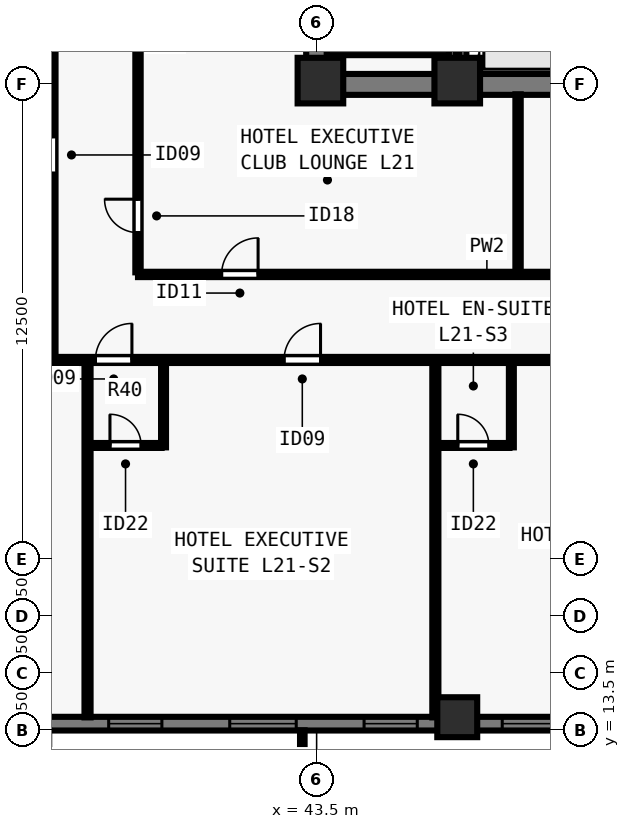
"""IFC4 building model, lengths in metres.
Left out: names, types, materials, properties, quantities, classifications, styles, units other than length and angle.
Written with IfcOpenShell. Run it as: python <this file> out.ifc"""

import sys

from ifc_helpers import new_model, si_unit, direction, frame, frame_2d, origin, origin_2d, place, context, subcontext, project, spatial, rectangle, extrude, element, fill, save


model = new_model("IFC4")
c1 = context("Model", 3, precision=1e-05, world=origin(), true_north=direction((0.0, 1.0)))
c2 = subcontext(c1, "Body", "Model", "MODEL_VIEW")
j1 = project(units=[si_unit("LENGTHUNIT", "METRE"), si_unit("PLANEANGLEUNIT", "RADIAN")], contexts=[c1])
p1 = place(None, origin())
s1 = spatial("IfcSite", under=j1, at=p1, CompositionType="ELEMENT")
p2 = place(p1, origin())
s2 = spatial("IfcBuilding", under=s1, at=p2, CompositionType="ELEMENT")
p3 = place(p2, frame((0.0, 0.0, 79.5)))
s3 = spatial("IfcBuildingStorey", under=s2, at=p3, CompositionType="ELEMENT", Elevation=79.5)
for number, where, z_axis, x_axis in (
    (1, (43.6, 30.6, 0.0), (0.0, 0.0, 1.0), (1.0, 0.0, 0.0)),
    (2, (47.2, 30.6, 0.0), (0.0, 0.0, 1.0), (1.0, 0.0, 0.0)),
):
    element("IfcColumn", number, at=place(p3, frame(where, z_axis=z_axis, x_axis=x_axis)), inside=s3, PredefinedType="COLUMN", context=c2, shape_type="SweptSolid", body=[
        extrude(rectangle(XDim=1.2, YDim=1.2, at=origin_2d()), origin(), (0.0, 0.0, 1.0), 3.5),
    ])
p4 = place(p3, frame((47.2, 13.85, 0.0), z_axis=(0.0, 0.0, 1.0), x_axis=(1.0, 0.0, 0.0)))
e3 = element("IfcColumn", 3, at=p4, inside=s3, PredefinedType="COLUMN", context=c2, shape_type="SweptSolid", body=[
    extrude(rectangle(XDim=1.05, YDim=1.05, at=origin_2d()), origin(), (0.0, 0.0, 1.0), 3.5),
])
p5 = place(p3, frame((74.5, 13.68, 0.0), z_axis=(0.0, 0.0, 1.0), x_axis=(-1.0, 0.0, 0.0)))
e4 = element("IfcWall", 4, at=p5, inside=s3, PredefinedType="SOLIDWALL", context=c2, shape_type="SweptSolid", body=[
    extrude(rectangle(XDim=44.662, YDim=0.36, at=frame_2d((22.331, 0.0))), origin(), (0.0, 0.0, 1.0), 3.28),
])
p6 = place(p5, frame((4.655, 0.0, 0.8)))
e5 = element("IfcOpeningElement", 5, at=p6, cuts=e4, PredefinedType="OPENING", context=c2, shape_type="SweptSolid", body=[
    extrude(rectangle(XDim=1.75, YDim=1.544, at=frame_2d((0.875, 0.772))), frame((0.0, 0.19, 0.0), z_axis=(0.0, -1.0, 0.0), x_axis=(1.0, 0.0, 0.0)), (0.0, 0.0, 1.0), 0.38),
])
p7 = place(p5, frame((8.19, 0.0, 0.8)))
e6 = element("IfcOpeningElement", 6, at=p7, cuts=e4, PredefinedType="OPENING", context=c2, shape_type="SweptSolid", body=[
    extrude(rectangle(XDim=1.4, YDim=1.544, at=frame_2d((0.7, 0.772))), frame((0.0, 0.19, 0.0), z_axis=(0.0, -1.0, 0.0), x_axis=(1.0, 0.0, 0.0)), (0.0, 0.0, 1.0), 0.38),
])
p8 = place(p5, frame((11.375, 0.0, 0.8)))
e7 = element("IfcOpeningElement", 7, at=p8, cuts=e4, PredefinedType="OPENING", context=c2, shape_type="SweptSolid", body=[
    extrude(rectangle(XDim=1.75, YDim=1.544, at=frame_2d((0.875, 0.772))), frame((0.0, 0.19, 0.0), z_axis=(0.0, -1.0, 0.0), x_axis=(1.0, 0.0, 0.0)), (0.0, 0.0, 1.0), 0.38),
])
p9 = place(p5, frame((14.911, 0.0, 0.8)))
e8 = element("IfcOpeningElement", 8, at=p9, cuts=e4, PredefinedType="OPENING", context=c2, shape_type="SweptSolid", body=[
    extrude(rectangle(XDim=1.4, YDim=1.544, at=frame_2d((0.7, 0.772))), frame((0.0, 0.19, 0.0), z_axis=(0.0, -1.0, 0.0), x_axis=(1.0, 0.0, 0.0)), (0.0, 0.0, 1.0), 0.38),
])
p10 = place(p5, frame((18.546, 0.0, 0.8)))
e9 = element("IfcOpeningElement", 9, at=p10, cuts=e4, PredefinedType="OPENING", context=c2, shape_type="SweptSolid", body=[
    extrude(rectangle(XDim=1.75, YDim=1.544, at=frame_2d((0.875, 0.772))), frame((0.0, 0.19, 0.0), z_axis=(0.0, -1.0, 0.0), x_axis=(1.0, 0.0, 0.0)), (0.0, 0.0, 1.0), 0.38),
])
p11 = place(p5, frame((21.631, 0.0, 0.8)))
e10 = element("IfcOpeningElement", 10, at=p11, cuts=e4, PredefinedType="OPENING", context=c2, shape_type="SweptSolid", body=[
    extrude(rectangle(XDim=1.4, YDim=1.544, at=frame_2d((0.7, 0.772))), frame((0.0, 0.19, 0.0), z_axis=(0.0, -1.0, 0.0), x_axis=(1.0, 0.0, 0.0)), (0.0, 0.0, 1.0), 0.38),
])
p12 = place(p5, frame((24.366, 0.0, 0.8)))
e11 = element("IfcOpeningElement", 11, at=p12, cuts=e4, PredefinedType="OPENING", context=c2, shape_type="SweptSolid", body=[
    extrude(rectangle(XDim=1.75, YDim=1.544, at=frame_2d((0.875, 0.772))), frame((0.0, 0.19, 0.0), z_axis=(0.0, -1.0, 0.0), x_axis=(1.0, 0.0, 0.0)), (0.0, 0.0, 1.0), 0.38),
])
p13 = place(p5, frame((28.351, 0.0, 0.8)))
e12 = element("IfcOpeningElement", 12, at=p13, cuts=e4, PredefinedType="OPENING", context=c2, shape_type="SweptSolid", body=[
    extrude(rectangle(XDim=1.4, YDim=1.544, at=frame_2d((0.7, 0.772))), frame((0.0, 0.19, 0.0), z_axis=(0.0, -1.0, 0.0), x_axis=(1.0, 0.0, 0.0)), (0.0, 0.0, 1.0), 0.38),
])
p14 = place(p5, frame((31.537, 0.0, 0.8)))
e13 = element("IfcOpeningElement", 13, at=p14, cuts=e4, PredefinedType="OPENING", context=c2, shape_type="SweptSolid", body=[
    extrude(rectangle(XDim=1.75, YDim=1.544, at=frame_2d((0.875, 0.772))), frame((0.0, 0.19, 0.0), z_axis=(0.0, -1.0, 0.0), x_axis=(1.0, 0.0, 0.0)), (0.0, 0.0, 1.0), 0.38),
])
p15 = place(p5, frame((35.072, 0.0, 0.8)))
e14 = element("IfcOpeningElement", 14, at=p15, cuts=e4, PredefinedType="OPENING", context=c2, shape_type="SweptSolid", body=[
    extrude(rectangle(XDim=1.4, YDim=1.544, at=frame_2d((0.7, 0.772))), frame((0.0, 0.19, 0.0), z_axis=(0.0, -1.0, 0.0), x_axis=(1.0, 0.0, 0.0)), (0.0, 0.0, 1.0), 0.38),
])
p16 = place(p5, frame((38.257, 0.0, 0.8)))
e15 = element("IfcOpeningElement", 15, at=p16, cuts=e4, PredefinedType="OPENING", context=c2, shape_type="SweptSolid", body=[
    extrude(rectangle(XDim=1.75, YDim=1.544, at=frame_2d((0.875, 0.772))), frame((0.0, 0.19, 0.0), z_axis=(0.0, -1.0, 0.0), x_axis=(1.0, 0.0, 0.0)), (0.0, 0.0, 1.0), 0.38),
])
p17 = place(p3, frame((43.225, 30.5, 0.0), z_axis=(0.0, 0.0, 1.0), x_axis=(1.0, 0.0, 0.0)))
e16 = element("IfcWall", 16, at=p17, inside=s3, PredefinedType="SHEAR", context=c2, shape_type="SweptSolid", body=[
    extrude(rectangle(XDim=17.55, YDim=0.55, at=frame_2d((8.775, 0.0))), origin(), (0.0, 0.0, 1.0), 3.28),
])
p18 = place(p3, frame((43.5, 30.765, 0.0), z_axis=(0.0, 0.0, 1.0), x_axis=(0.0, 1.0, 0.0)))
e17 = element("IfcWall", 17, at=p18, inside=s3, PredefinedType="SHEAR", context=c2, shape_type="SweptSolid", body=[
    extrude(rectangle(XDim=7.985, YDim=0.55, at=frame_2d((3.993, 0.0))), origin(), (0.0, 0.0, 1.0), 3.28),
])
p19 = place(p3, frame((47.35, 30.76, 0.0), z_axis=(0.0, 0.0, 1.0), x_axis=(0.0, 1.0, 0.0)))
e18 = element("IfcWall", 18, at=p19, inside=s3, PredefinedType="SOLIDWALL", context=c2, shape_type="SweptSolid", body=[
    extrude(rectangle(XDim=7.855, YDim=0.18, at=frame_2d((3.927, 0.0))), origin(), (0.0, 0.0, 1.0), 3.28),
])
p20 = place(p3, frame((36.55, 23.25, 0.0), z_axis=(0.0, 0.0, 1.0), x_axis=(1.0, 0.0, 0.0)))
e19 = element("IfcWall", 19, at=p20, inside=s3, PredefinedType="PARTITIONING", context=c2, shape_type="SweptSolid", body=[
    extrude(rectangle(XDim=30.9, YDim=0.16, at=frame_2d((15.45, 0.0))), origin(), (0.0, 0.0, 1.0), 3.28),
])
p21 = place(p20, frame((1.13, 0.0, 0.0)))
e20 = element("IfcOpeningElement", 20, at=p21, cuts=e19, PredefinedType="OPENING", context=c2, shape_type="SweptSolid", body=[
    extrude(rectangle(XDim=0.96, YDim=2.15, at=frame_2d((0.48, 1.075))), frame((0.0, 0.09, 0.0), z_axis=(0.0, -1.0, 0.0), x_axis=(1.0, 0.0, 0.0)), (0.0, 0.0, 1.0), 0.18),
])
p22 = place(p20, frame((6.093, 0.0, 0.0)))
e21 = element("IfcOpeningElement", 21, at=p22, cuts=e19, PredefinedType="OPENING", context=c2, shape_type="SweptSolid", body=[
    extrude(rectangle(XDim=0.96, YDim=2.15, at=frame_2d((0.48, 1.075))), frame((0.0, 0.09, 0.0), z_axis=(0.0, -1.0, 0.0), x_axis=(1.0, 0.0, 0.0)), (0.0, 0.0, 1.0), 0.18),
])
p23 = place(p20, frame((16.125, 0.0, 0.0)))
e22 = element("IfcOpeningElement", 22, at=p23, cuts=e19, PredefinedType="OPENING", context=c2, shape_type="SweptSolid", body=[
    extrude(rectangle(XDim=0.96, YDim=2.15, at=frame_2d((0.48, 1.075))), frame((0.0, 0.09, 0.0), z_axis=(0.0, -1.0, 0.0), x_axis=(1.0, 0.0, 0.0)), (0.0, 0.0, 1.0), 0.18),
])
p24 = place(p20, frame((26.157, 0.0, 0.0)))
e23 = element("IfcOpeningElement", 23, at=p24, cuts=e19, PredefinedType="OPENING", context=c2, shape_type="SweptSolid", body=[
    extrude(rectangle(XDim=0.96, YDim=2.15, at=frame_2d((0.48, 1.075))), frame((0.0, 0.09, 0.0), z_axis=(0.0, -1.0, 0.0), x_axis=(1.0, 0.0, 0.0)), (0.0, 0.0, 1.0), 0.18),
])
p25 = place(p20, frame((28.92, 0.0, 0.0)))
e24 = element("IfcOpeningElement", 24, at=p25, cuts=e19, PredefinedType="OPENING", context=c2, shape_type="SweptSolid", body=[
    extrude(rectangle(XDim=0.96, YDim=2.15, at=frame_2d((0.48, 1.075))), frame((0.0, 0.09, 0.0), z_axis=(0.0, -1.0, 0.0), x_axis=(1.0, 0.0, 0.0)), (0.0, 0.0, 1.0), 0.18),
])
p26 = place(p3, frame((36.55, 23.315, 0.0), z_axis=(0.0, 0.0, 1.0), x_axis=(0.0, 1.0, 0.0)))
e25 = element("IfcWall", 25, at=p26, inside=s3, PredefinedType="PARTITIONING", context=c2, shape_type="SweptSolid", body=[
    extrude(rectangle(XDim=31.37, YDim=0.16, at=frame_2d((15.685, 0.0))), origin(), (0.0, 0.0, 1.0), 3.28),
])
p27 = place(p26, frame((4.848, 0.0, 0.0)))
e26 = element("IfcOpeningElement", 26, at=p27, cuts=e25, PredefinedType="OPENING", context=c2, shape_type="SweptSolid", body=[
    extrude(rectangle(XDim=0.96, YDim=2.15, at=frame_2d((0.48, 1.075))), frame((0.0, 0.09, 0.0), z_axis=(0.0, -1.0, 0.0), x_axis=(1.0, 0.0, 0.0)), (0.0, 0.0, 1.0), 0.18),
])
p28 = place(p26, frame((12.39, 0.0, 0.0)))
e27 = element("IfcOpeningElement", 27, at=p28, cuts=e25, PredefinedType="OPENING", context=c2, shape_type="SweptSolid", body=[
    extrude(rectangle(XDim=0.96, YDim=2.15, at=frame_2d((0.48, 1.075))), frame((0.0, 0.09, 0.0), z_axis=(0.0, -1.0, 0.0), x_axis=(1.0, 0.0, 0.0)), (0.0, 0.0, 1.0), 0.18),
])
p29 = place(p26, frame((20.265, 0.0, 0.0)))
e28 = element("IfcOpeningElement", 28, at=p29, cuts=e25, PredefinedType="OPENING", context=c2, shape_type="SweptSolid", body=[
    extrude(rectangle(XDim=0.96, YDim=2.15, at=frame_2d((0.48, 1.075))), frame((0.0, 0.09, 0.0), z_axis=(0.0, -1.0, 0.0), x_axis=(1.0, 0.0, 0.0)), (0.0, 0.0, 1.0), 0.18),
])
p30 = place(p26, frame((28.223, 0.0, 0.0)))
e29 = element("IfcOpeningElement", 29, at=p30, cuts=e25, PredefinedType="OPENING", context=c2, shape_type="SweptSolid", body=[
    extrude(rectangle(XDim=0.96, YDim=2.15, at=frame_2d((0.48, 1.075))), frame((0.0, 0.09, 0.0), z_axis=(0.0, -1.0, 0.0), x_axis=(1.0, 0.0, 0.0)), (0.0, 0.0, 1.0), 0.18),
])
p31 = place(p3, frame((38.8, 25.5, 0.0), z_axis=(0.0, 0.0, 1.0), x_axis=(1.0, 0.0, 0.0)))
e30 = element("IfcWall", 30, at=p31, inside=s3, PredefinedType="PARTITIONING", context=c2, shape_type="SweptSolid", body=[
    extrude(rectangle(XDim=26.4, YDim=0.14, at=frame_2d((13.2, 0.0))), origin(), (0.0, 0.0, 1.0), 3.28),
])
p32 = place(p31, frame((2.2, 0.0, 0.0)))
e31 = element("IfcOpeningElement", 31, at=p32, cuts=e30, PredefinedType="OPENING", context=c2, shape_type="SweptSolid", body=[
    extrude(rectangle(XDim=0.96, YDim=2.12, at=frame_2d((0.48, 1.06))), frame((0.0, 0.08, 0.0), z_axis=(0.0, -1.0, 0.0), x_axis=(1.0, 0.0, 0.0)), (0.0, 0.0, 1.0), 0.16),
])
p33 = place(p31, frame((15.2, 0.0, 0.0)))
e32 = element("IfcOpeningElement", 32, at=p33, cuts=e30, PredefinedType="OPENING", context=c2, shape_type="SweptSolid", body=[
    extrude(rectangle(XDim=0.96, YDim=2.12, at=frame_2d((0.48, 1.06))), frame((0.0, 0.08, 0.0), z_axis=(0.0, -1.0, 0.0), x_axis=(1.0, 0.0, 0.0)), (0.0, 0.0, 1.0), 0.16),
])
p34 = place(p3, frame((38.8, 25.555, 0.0), z_axis=(0.0, 0.0, 1.0), x_axis=(0.0, 1.0, 0.0)))
e33 = element("IfcWall", 33, at=p34, inside=s3, PredefinedType="PARTITIONING", context=c2, shape_type="SweptSolid", body=[
    extrude(rectangle(XDim=13.195, YDim=0.14, at=frame_2d((6.598, 0.0))), origin(), (0.0, 0.0, 1.0), 3.28),
])
p35 = place(p34, frame((1.045, 0.0, 0.0)))
e34 = element("IfcOpeningElement", 34, at=p35, cuts=e33, PredefinedType="OPENING", context=c2, shape_type="SweptSolid", body=[
    extrude(rectangle(XDim=0.88, YDim=2.1, at=frame_2d((0.44, 1.05))), frame((0.0, 0.08, 0.0), z_axis=(0.0, -1.0, 0.0), x_axis=(1.0, 0.0, 0.0)), (0.0, 0.0, 1.0), 0.16),
])
p36 = place(p34, frame((10.245, 0.0, 0.0)))
e35 = element("IfcOpeningElement", 35, at=p36, cuts=e33, PredefinedType="OPENING", context=c2, shape_type="SweptSolid", body=[
    extrude(rectangle(XDim=0.88, YDim=2.1, at=frame_2d((0.44, 1.05))), frame((0.0, 0.08, 0.0), z_axis=(0.0, -1.0, 0.0), x_axis=(1.0, 0.0, 0.0)), (0.0, 0.0, 1.0), 0.16),
])
p37 = place(p3, frame((48.8, 25.555, 0.0), z_axis=(0.0, 0.0, 1.0), x_axis=(0.0, 1.0, 0.0)))
e36 = element("IfcWall", 36, at=p37, inside=s3, PredefinedType="PARTITIONING", context=c2, shape_type="SweptSolid", body=[
    extrude(rectangle(XDim=4.685, YDim=0.14, at=frame_2d((2.343, 0.0))), origin(), (0.0, 0.0, 1.0), 3.28),
])
p38 = place(p3, frame((37.472, 13.845, 0.0), z_axis=(0.0, 0.0, 1.0), x_axis=(0.0, 1.0, 0.0)))
e37 = element("IfcWall", 37, at=p38, inside=s3, PredefinedType="PARTITIONING", context=c2, shape_type="SweptSolid", body=[
    extrude(rectangle(XDim=9.34, YDim=0.16, at=frame_2d((4.67, 0.0))), origin(), (0.0, 0.0, 1.0), 3.28),
])
p39 = place(p3, frame((39.472, 20.95, 0.0), z_axis=(0.0, 0.0, 1.0), x_axis=(0.0, 1.0, 0.0)))
e38 = element("IfcWall", 38, at=p39, inside=s3, PredefinedType="PLUMBINGWALL", context=c2, shape_type="SweptSolid", body=[
    extrude(rectangle(XDim=2.235, YDim=0.13, at=frame_2d((1.118, 0.0))), origin(), (0.0, 0.0, 1.0), 3.28),
])
p40 = place(p3, frame((37.537, 21.0, 0.0), z_axis=(0.0, 0.0, 1.0), x_axis=(1.0, 0.0, 0.0)))
e39 = element("IfcWall", 39, at=p40, inside=s3, PredefinedType="PLUMBINGWALL", context=c2, shape_type="SweptSolid", body=[
    extrude(rectangle(XDim=1.885, YDim=0.13, at=frame_2d((0.942, 0.0))), origin(), (0.0, 0.0, 1.0), 3.28),
])
p41 = place(p40, frame((0.525, 0.0, 0.0)))
e40 = element("IfcOpeningElement", 40, at=p41, cuts=e39, PredefinedType="OPENING", context=c2, shape_type="SweptSolid", body=[
    extrude(rectangle(XDim=0.82, YDim=2.1, at=frame_2d((0.41, 1.05))), frame((0.0, 0.075, 0.0), z_axis=(0.0, -1.0, 0.0), x_axis=(1.0, 0.0, 0.0)), (0.0, 0.0, 1.0), 0.15),
])
p42 = place(p3, frame((46.624, 13.845, 0.0), z_axis=(0.0, 0.0, 1.0), x_axis=(0.0, 1.0, 0.0)))
e41 = element("IfcWall", 41, at=p42, inside=s3, PredefinedType="PARTITIONING", context=c2, shape_type="SweptSolid", body=[
    extrude(rectangle(XDim=9.34, YDim=0.16, at=frame_2d((4.67, 0.0))), origin(), (0.0, 0.0, 1.0), 3.28),
])
p43 = place(p3, frame((48.624, 20.95, 0.0), z_axis=(0.0, 0.0, 1.0), x_axis=(0.0, 1.0, 0.0)))
e42 = element("IfcWall", 42, at=p43, inside=s3, PredefinedType="PLUMBINGWALL", context=c2, shape_type="SweptSolid", body=[
    extrude(rectangle(XDim=2.235, YDim=0.13, at=frame_2d((1.118, 0.0))), origin(), (0.0, 0.0, 1.0), 3.28),
])
p44 = place(p3, frame((46.689, 21.0, 0.0), z_axis=(0.0, 0.0, 1.0), x_axis=(1.0, 0.0, 0.0)))
e43 = element("IfcWall", 43, at=p44, inside=s3, PredefinedType="PLUMBINGWALL", context=c2, shape_type="SweptSolid", body=[
    extrude(rectangle(XDim=1.885, YDim=0.13, at=frame_2d((0.942, 0.0))), origin(), (0.0, 0.0, 1.0), 3.28),
])
p45 = place(p44, frame((0.525, 0.0, 0.0)))
e44 = element("IfcOpeningElement", 44, at=p45, cuts=e43, PredefinedType="OPENING", context=c2, shape_type="SweptSolid", body=[
    extrude(rectangle(XDim=0.82, YDim=2.1, at=frame_2d((0.41, 1.05))), frame((0.0, 0.075, 0.0), z_axis=(0.0, -1.0, 0.0), x_axis=(1.0, 0.0, 0.0)), (0.0, 0.0, 1.0), 0.15),
])
p46 = place(p3, frame((43.765, 31.36, 0.0), z_axis=(0.0, 0.0, 1.0), x_axis=(1.0, 0.0, 0.0)))
e45 = element("IfcWall", 45, at=p46, inside=s3, PredefinedType="SOLIDWALL", context=c2, shape_type="SweptSolid", body=[
    extrude(rectangle(XDim=3.23, YDim=0.18, at=frame_2d((1.615, 0.0))), origin(), (0.0, 0.0, 1.0), 3.28),
])
p47 = place(p3, frame((47.07, 38.78, 0.0), z_axis=(0.0, 0.0, 1.0), x_axis=(0.0, -1.0, 0.0)))
e46 = element("IfcWall", 46, at=p47, inside=s3, PredefinedType="SOLIDWALL", context=c2, shape_type="SweptSolid", body=[
    extrude(rectangle(XDim=8.017, YDim=0.18, at=frame_2d((4.009, 0.0))), origin(), (0.0, 0.0, 1.0), 3.28),
])
p48 = place(p12, origin())
e47 = element("IfcWindow", 47, at=p48, inside=s3, PartitioningType="SINGLE_PANEL", PredefinedType="WINDOW", context=c2, shape_type="SweptSolid", body=[
    extrude(rectangle(XDim=1.75, YDim=1.544, at=frame_2d((0.875, 0.772))), frame((0.0, -0.05, 0.0), z_axis=(0.0, -1.0, 0.0), x_axis=(1.0, 0.0, 0.0)), (0.0, 0.0, 1.0), 0.06),
])
fill(e11, e47)
p49 = place(p13, origin())
e48 = element("IfcWindow", 48, at=p49, inside=s3, PartitioningType="SINGLE_PANEL", PredefinedType="WINDOW", context=c2, shape_type="SweptSolid", body=[
    extrude(rectangle(XDim=1.4, YDim=1.544, at=frame_2d((0.7, 0.772))), frame((0.0, -0.05, 0.0), z_axis=(0.0, -1.0, 0.0), x_axis=(1.0, 0.0, 0.0)), (0.0, 0.0, 1.0), 0.06),
])
fill(e12, e48)
p50 = place(p14, origin())
e49 = element("IfcWindow", 49, at=p50, inside=s3, PartitioningType="SINGLE_PANEL", PredefinedType="WINDOW", context=c2, shape_type="SweptSolid", body=[
    extrude(rectangle(XDim=1.75, YDim=1.544, at=frame_2d((0.875, 0.772))), frame((0.0, -0.05, 0.0), z_axis=(0.0, -1.0, 0.0), x_axis=(1.0, 0.0, 0.0)), (0.0, 0.0, 1.0), 0.06),
])
fill(e13, e49)
p51 = place(p15, origin())
e50 = element("IfcWindow", 50, at=p51, inside=s3, PartitioningType="SINGLE_PANEL", PredefinedType="WINDOW", context=c2, shape_type="SweptSolid", body=[
    extrude(rectangle(XDim=1.4, YDim=1.544, at=frame_2d((0.7, 0.772))), frame((0.0, -0.05, 0.0), z_axis=(0.0, -1.0, 0.0), x_axis=(1.0, 0.0, 0.0)), (0.0, 0.0, 1.0), 0.06),
])
fill(e14, e50)
p52 = place(p32, origin())
e51 = element("IfcDoor", 51, at=p52, inside=s3, OperationType="SINGLE_SWING_RIGHT", PredefinedType="DOOR", context=c2, shape_type="SweptSolid", body=[
    extrude(rectangle(XDim=0.96, YDim=2.12, at=frame_2d((0.48, 1.06))), frame((0.0, 0.025, 0.0), z_axis=(0.0, -1.0, 0.0), x_axis=(1.0, 0.0, 0.0)), (0.0, 0.0, 1.0), 0.05),
])
fill(e31, e51)
p53 = place(p35, origin())
e52 = element("IfcDoor", 52, at=p53, inside=s3, OperationType="SINGLE_SWING_RIGHT", PredefinedType="DOOR", context=c2, shape_type="SweptSolid", body=[
    extrude(rectangle(XDim=0.88, YDim=2.1, at=frame_2d((0.44, 1.05))), frame((0.0, 0.025, 0.0), z_axis=(0.0, -1.0, 0.0), x_axis=(1.0, 0.0, 0.0)), (0.0, 0.0, 1.0), 0.05),
])
fill(e34, e52)
p54 = place(p21, origin())
e53 = element("IfcDoor", 53, at=p54, inside=s3, OperationType="SINGLE_SWING_RIGHT", PredefinedType="DOOR", context=c2, shape_type="SweptSolid", body=[
    extrude(rectangle(XDim=0.96, YDim=2.15, at=frame_2d((0.48, 1.075))), frame((0.0, 0.025, 0.0), z_axis=(0.0, -1.0, 0.0), x_axis=(1.0, 0.0, 0.0)), (0.0, 0.0, 1.0), 0.05),
])
fill(e20, e53)
p55 = place(p41, origin())
e54 = element("IfcDoor", 54, at=p55, inside=s3, OperationType="SINGLE_SWING_LEFT", PredefinedType="DOOR", context=c2, shape_type="SweptSolid", body=[
    extrude(rectangle(XDim=0.82, YDim=2.1, at=frame_2d((0.41, 1.05))), frame((0.0, 0.025, 0.0), z_axis=(0.0, -1.0, 0.0), x_axis=(1.0, 0.0, 0.0)), (0.0, 0.0, 1.0), 0.05),
])
fill(e40, e54)
p56 = place(p22, origin())
e55 = element("IfcDoor", 55, at=p56, inside=s3, OperationType="SINGLE_SWING_RIGHT", PredefinedType="DOOR", context=c2, shape_type="SweptSolid", body=[
    extrude(rectangle(XDim=0.96, YDim=2.15, at=frame_2d((0.48, 1.075))), frame((0.0, 0.025, 0.0), z_axis=(0.0, -1.0, 0.0), x_axis=(1.0, 0.0, 0.0)), (0.0, 0.0, 1.0), 0.05),
])
fill(e21, e55)
p57 = place(p45, origin())
e56 = element("IfcDoor", 56, at=p57, inside=s3, OperationType="SINGLE_SWING_LEFT", PredefinedType="DOOR", context=c2, shape_type="SweptSolid", body=[
    extrude(rectangle(XDim=0.82, YDim=2.1, at=frame_2d((0.41, 1.05))), frame((0.0, 0.025, 0.0), z_axis=(0.0, -1.0, 0.0), x_axis=(1.0, 0.0, 0.0)), (0.0, 0.0, 1.0), 0.05),
])
fill(e44, e56)
p58 = place(p27, origin())
e57 = element("IfcDoor", 57, at=p58, inside=s3, OperationType="SINGLE_SWING_RIGHT", PredefinedType="DOOR", context=c2, shape_type="SweptSolid", body=[
    extrude(rectangle(XDim=0.96, YDim=2.15, at=frame_2d((0.48, 1.075))), frame((0.0, 0.025, 0.0), z_axis=(0.0, -1.0, 0.0), x_axis=(1.0, 0.0, 0.0)), (0.0, 0.0, 1.0), 0.05),
])
fill(e26, e57)
save(model, sys.argv[1])
